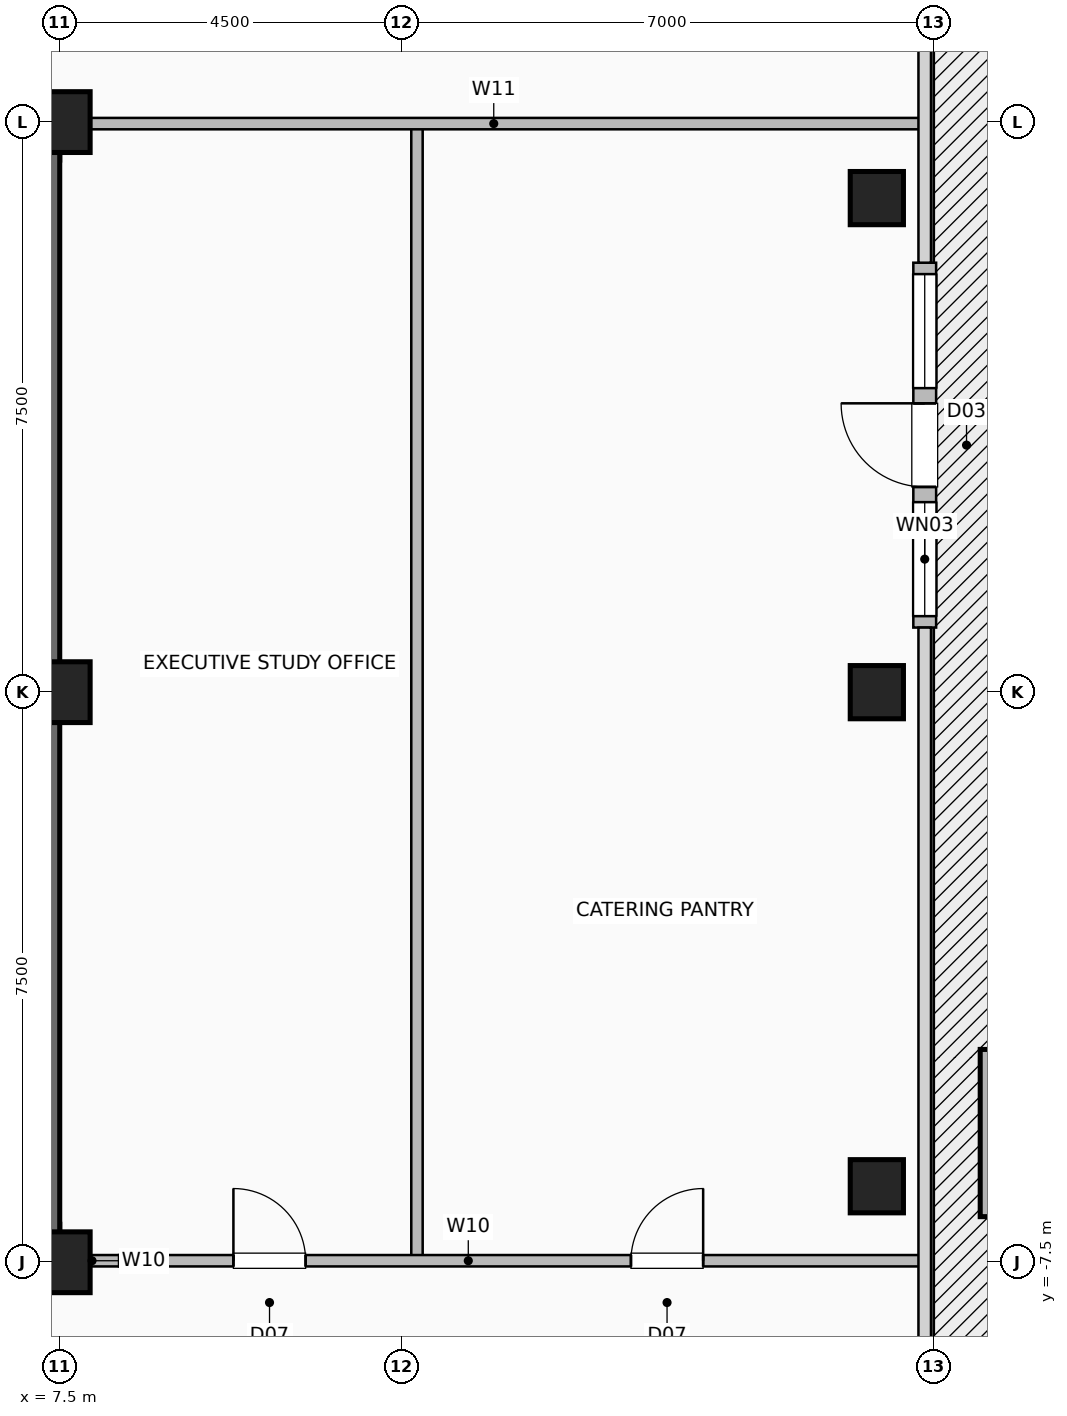
"""IFC4 building model, lengths in metres.
Left out: names, types, materials, properties, quantities, classifications, styles, units other than length and angle.
Written with IfcOpenShell. Run it as: python <this file> out.ifc"""

import sys

from ifc_helpers import new_model, si_unit, direction, frame, frame_2d, origin, origin_2d, place, context, subcontext, project, spatial, rectangle, hollow_rectangle, extrude, element, fill, save


model = new_model("IFC4")
c1 = context("Model", 3, precision=1e-05, world=origin(), true_north=direction((0.0, 1.0)))
c2 = subcontext(c1, "Body", "Model", "MODEL_VIEW")
j1 = project(units=[si_unit("LENGTHUNIT", "METRE"), si_unit("PLANEANGLEUNIT", "RADIAN")], contexts=[c1])
p1 = place(None, origin())
s1 = spatial("IfcSite", under=j1, at=p1, CompositionType="ELEMENT")
p2 = place(p1, origin())
s2 = spatial("IfcBuilding", under=s1, at=p2, CompositionType="ELEMENT")
p3 = place(p2, frame((0.0, 0.0, 264.8)))
s3 = spatial("IfcBuildingStorey", under=s2, at=p3, CompositionType="ELEMENT", Elevation=264.8)
for number, where, z_axis, x_axis in (
    (1, (7.5, -7.5, 0.0), (0.0, 0.0, 1.0), (1.0, 0.0, 0.0)),
    (2, (7.5, 0.0, 0.0), (0.0, 0.0, 1.0), (1.0, 0.0, 0.0)),
    (3, (7.5, 7.5, 0.0), (0.0, 0.0, 1.0), (1.0, 0.0, 0.0)),
):
    element("IfcColumn", number, at=place(p3, frame(where, z_axis=z_axis, x_axis=x_axis)), inside=s3, PredefinedType="COLUMN", context=c2, shape_type="SweptSolid", body=[
        extrude(hollow_rectangle(XDim=0.8, YDim=0.8, WallThickness=0.04, at=origin_2d()), origin(), (0.0, 0.0, 1.0), 3.6),
    ])
for number, where, z_axis, x_axis in (
    (4, (18.25, -6.5, 0.0), (0.0, 0.0, 1.0), (1.0, 0.0, 0.0)),
    (5, (18.25, 0.0, 0.0), (0.0, 0.0, 1.0), (1.0, 0.0, 0.0)),
    (6, (18.25, 6.5, 0.0), (0.0, 0.0, 1.0), (1.0, 0.0, 0.0)),
):
    element("IfcColumn", number, at=place(p3, frame(where, z_axis=z_axis, x_axis=x_axis)), inside=s3, PredefinedType="COLUMN", context=c2, shape_type="SweptSolid", body=[
        extrude(hollow_rectangle(XDim=0.7, YDim=0.7, WallThickness=0.035, at=origin_2d()), origin(), (0.0, 0.0, 1.0), 3.6),
    ])
p4 = place(p3, frame((18.88, 0.85, 0.0), z_axis=(0.0, 0.0, 1.0), x_axis=(0.0, 1.0, 0.0)))
e7 = element("IfcWall", 7, at=p4, inside=s3, PredefinedType="SOLIDWALL", context=c2, shape_type="SweptSolid", body=[
    extrude(rectangle(XDim=4.8, YDim=0.3, at=frame_2d((2.4, 0.0))), origin(), (0.0, 0.0, 1.0), 3.36),
])
p5 = place(p4, frame((1.85, 0.0, 0.0)))
e8 = element("IfcOpeningElement", 8, at=p5, cuts=e7, PredefinedType="OPENING", context=c2, shape_type="SweptSolid", body=[
    extrude(rectangle(XDim=1.1, YDim=2.2, at=frame_2d((0.55, 1.1))), frame((0.0, 0.16, 0.0), z_axis=(0.0, -1.0, 0.0), x_axis=(1.0, 0.0, 0.0)), (0.0, 0.0, 1.0), 0.32),
])
p6 = place(p4, frame((0.15, 0.0, 0.85)))
e9 = element("IfcOpeningElement", 9, at=p6, cuts=e7, PredefinedType="OPENING", context=c2, shape_type="SweptSolid", body=[
    extrude(rectangle(XDim=1.5, YDim=1.8, at=frame_2d((0.75, 0.9))), frame((0.0, 0.16, 0.0), z_axis=(0.0, -1.0, 0.0), x_axis=(1.0, 0.0, 0.0)), (0.0, 0.0, 1.0), 0.32),
])
p7 = place(p4, frame((3.15, 0.0, 0.85)))
e10 = element("IfcOpeningElement", 10, at=p7, cuts=e7, PredefinedType="OPENING", context=c2, shape_type="SweptSolid", body=[
    extrude(rectangle(XDim=1.5, YDim=1.8, at=frame_2d((0.75, 0.9))), frame((0.0, 0.16, 0.0), z_axis=(0.0, -1.0, 0.0), x_axis=(1.0, 0.0, 0.0)), (0.0, 0.0, 1.0), 0.32),
])
p8 = place(p3, frame((-7.5, -7.25, 0.0), z_axis=(0.0, 0.0, 1.0), x_axis=(1.0, 0.0, 0.0)))
e11 = element("IfcWall", 11, at=p8, inside=s3, PredefinedType="SHEAR", context=c2, shape_type="SweptSolid", body=[
    extrude(rectangle(XDim=15.0, YDim=0.5, at=frame_2d((7.5, 0.0))), origin(), (0.0, 0.0, 1.0), 3.36),
])
p9 = place(p8, frame((1.55, 0.0, 0.0)))
e12 = element("IfcOpeningElement", 12, at=p9, cuts=e11, PredefinedType="OPENING", context=c2, shape_type="SweptSolid", body=[
    extrude(rectangle(XDim=1.05, YDim=2.08, at=frame_2d((0.525, 1.04))), frame((0.0, 0.26, 0.0), z_axis=(0.0, -1.0, 0.0), x_axis=(1.0, 0.0, 0.0)), (0.0, 0.0, 1.0), 0.52),
])
p10 = place(p8, frame((12.4, 0.0, 0.0)))
e13 = element("IfcOpeningElement", 13, at=p10, cuts=e11, PredefinedType="OPENING", context=c2, shape_type="SweptSolid", body=[
    extrude(rectangle(XDim=1.05, YDim=2.08, at=frame_2d((0.525, 1.04))), frame((0.0, 0.26, 0.0), z_axis=(0.0, -1.0, 0.0), x_axis=(1.0, 0.0, 0.0)), (0.0, 0.0, 1.0), 0.52),
])
p11 = place(p8, frame((4.95, 0.0, 0.0)))
e14 = element("IfcOpeningElement", 14, at=p11, cuts=e11, PredefinedType="OPENING", context=c2, shape_type="SweptSolid", body=[
    extrude(rectangle(XDim=1.0, YDim=2.08, at=frame_2d((0.5, 1.04))), frame((0.0, 0.26, 0.0), z_axis=(0.0, -1.0, 0.0), x_axis=(1.0, 0.0, 0.0)), (0.0, 0.0, 1.0), 0.52),
])
p12 = place(p8, frame((7.05, 0.0, 0.0)))
e15 = element("IfcOpeningElement", 15, at=p12, cuts=e11, PredefinedType="OPENING", context=c2, shape_type="SweptSolid", body=[
    extrude(rectangle(XDim=1.0, YDim=2.08, at=frame_2d((0.5, 1.04))), frame((0.0, 0.26, 0.0), z_axis=(0.0, -1.0, 0.0), x_axis=(1.0, 0.0, 0.0)), (0.0, 0.0, 1.0), 0.52),
])
p13 = place(p8, frame((9.15, 0.0, 0.0)))
e16 = element("IfcOpeningElement", 16, at=p13, cuts=e11, PredefinedType="OPENING", context=c2, shape_type="SweptSolid", body=[
    extrude(rectangle(XDim=1.0, YDim=2.08, at=frame_2d((0.5, 1.04))), frame((0.0, 0.26, 0.0), z_axis=(0.0, -1.0, 0.0), x_axis=(1.0, 0.0, 0.0)), (0.0, 0.0, 1.0), 0.52),
])
for number, where, z_axis, x_axis in (
    (17, (-7.5, 7.25, 0.0), (0.0, 0.0, 1.0), (1.0, 0.0, 0.0)),
    (18, (7.25, -7.5, 0.0), (0.0, 0.0, 1.0), (0.0, 1.0, 0.0)),
):
    element("IfcWall", number, at=place(p3, frame(where, z_axis=z_axis, x_axis=x_axis)), inside=s3, PredefinedType="SHEAR", context=c2, shape_type="SweptSolid", body=[
        extrude(rectangle(XDim=15.0, YDim=0.5, at=frame_2d((7.5, 0.0))), origin(), (0.0, 0.0, 1.0), 3.36),
    ])
p14 = place(p3, frame((7.45, -7.48, 0.0), z_axis=(0.0, 0.0, 1.0), x_axis=(1.0, 0.0, 0.0)))
e19 = element("IfcWall", 19, at=p14, inside=s3, PredefinedType="PARTITIONING", context=c2, shape_type="SweptSolid", body=[
    extrude(rectangle(XDim=0.95, YDim=0.15, at=frame_2d((0.475, 0.0))), origin(), (0.0, 0.0, 1.0), 3.36),
])
p15 = place(p3, frame((12.2, -7.48, 0.0), z_axis=(0.0, 0.0, 1.0), x_axis=(0.0, 1.0, 0.0)))
e20 = element("IfcWall", 20, at=p15, inside=s3, PredefinedType="PARTITIONING", context=c2, shape_type="SweptSolid", body=[
    extrude(rectangle(XDim=14.9, YDim=0.15, at=frame_2d((7.45, 0.0))), origin(), (0.0, 0.0, 1.0), 3.36),
])
p16 = place(p3, frame((8.28, -7.48, 0.0), z_axis=(0.0, 0.0, 1.0), x_axis=(1.0, 0.0, 0.0)))
e21 = element("IfcWall", 21, at=p16, inside=s3, PredefinedType="PARTITIONING", context=c2, shape_type="SweptSolid", body=[
    extrude(rectangle(XDim=10.54, YDim=0.15, at=frame_2d((5.27, 0.0))), origin(), (0.0, 0.0, 1.0), 3.36),
])
p17 = place(p16, frame((1.505, 0.0, 0.0)))
e22 = element("IfcOpeningElement", 22, at=p17, cuts=e21, PredefinedType="OPENING", context=c2, shape_type="SweptSolid", body=[
    extrude(rectangle(XDim=0.95, YDim=2.06, at=frame_2d((0.475, 1.03))), frame((0.0, 0.085, 0.0), z_axis=(0.0, -1.0, 0.0), x_axis=(1.0, 0.0, 0.0)), (0.0, 0.0, 1.0), 0.17),
])
p18 = place(p16, frame((6.735, 0.0, 0.0)))
e23 = element("IfcOpeningElement", 23, at=p18, cuts=e21, PredefinedType="OPENING", context=c2, shape_type="SweptSolid", body=[
    extrude(rectangle(XDim=0.95, YDim=2.06, at=frame_2d((0.475, 1.03))), frame((0.0, 0.085, 0.0), z_axis=(0.0, -1.0, 0.0), x_axis=(1.0, 0.0, 0.0)), (0.0, 0.0, 1.0), 0.17),
])
p19 = place(p3, frame((7.6, 7.48, 0.0), z_axis=(0.0, 0.0, 1.0), x_axis=(1.0, 0.0, 0.0)))
e24 = element("IfcWall", 24, at=p19, inside=s3, PredefinedType="PARTITIONING", context=c2, shape_type="SweptSolid", body=[
    extrude(rectangle(XDim=11.22, YDim=0.15, at=frame_2d((5.61, 0.0))), origin(), (0.0, 0.0, 1.0), 3.36),
])
p20 = place(p5, origin())
e25 = element("IfcDoor", 25, at=p20, inside=s3, OperationType="SINGLE_SWING_RIGHT", PredefinedType="DOOR", context=c2, shape_type="SweptSolid", body=[
    extrude(rectangle(XDim=1.1, YDim=2.2, at=frame_2d((0.55, 1.1))), frame((0.0, 0.025, 0.0), z_axis=(0.0, -1.0, 0.0), x_axis=(1.0, 0.0, 0.0)), (0.0, 0.0, 1.0), 0.05),
])
fill(e8, e25)
p21 = place(p6, origin())
e26 = element("IfcWindow", 26, at=p21, inside=s3, PartitioningType="SINGLE_PANEL", PredefinedType="WINDOW", context=c2, shape_type="SweptSolid", body=[
    extrude(rectangle(XDim=1.5, YDim=1.8, at=frame_2d((0.75, 0.9))), frame((0.0, 0.03, 0.0), z_axis=(0.0, -1.0, 0.0), x_axis=(1.0, 0.0, 0.0)), (0.0, 0.0, 1.0), 0.06),
])
fill(e9, e26)
p22 = place(p7, origin())
e27 = element("IfcWindow", 27, at=p22, inside=s3, PartitioningType="SINGLE_PANEL", PredefinedType="WINDOW", context=c2, shape_type="SweptSolid", body=[
    extrude(rectangle(XDim=1.5, YDim=1.8, at=frame_2d((0.75, 0.9))), frame((0.0, 0.03, 0.0), z_axis=(0.0, -1.0, 0.0), x_axis=(1.0, 0.0, 0.0)), (0.0, 0.0, 1.0), 0.06),
])
fill(e10, e27)
p23 = place(p17, origin())
e28 = element("IfcDoor", 28, at=p23, inside=s3, OperationType="SINGLE_SWING_LEFT", PredefinedType="DOOR", context=c2, shape_type="SweptSolid", body=[
    extrude(rectangle(XDim=0.95, YDim=2.06, at=frame_2d((0.475, 1.03))), frame((0.0, 0.025, 0.0), z_axis=(0.0, -1.0, 0.0), x_axis=(1.0, 0.0, 0.0)), (0.0, 0.0, 1.0), 0.05),
])
fill(e22, e28)
p24 = place(p18, origin())
e29 = element("IfcDoor", 29, at=p24, inside=s3, OperationType="SINGLE_SWING_RIGHT", PredefinedType="DOOR", context=c2, shape_type="SweptSolid", body=[
    extrude(rectangle(XDim=0.95, YDim=2.06, at=frame_2d((0.475, 1.03))), frame((0.0, 0.025, 0.0), z_axis=(0.0, -1.0, 0.0), x_axis=(1.0, 0.0, 0.0)), (0.0, 0.0, 1.0), 0.05),
])
fill(e23, e29)
save(model, sys.argv[1])
